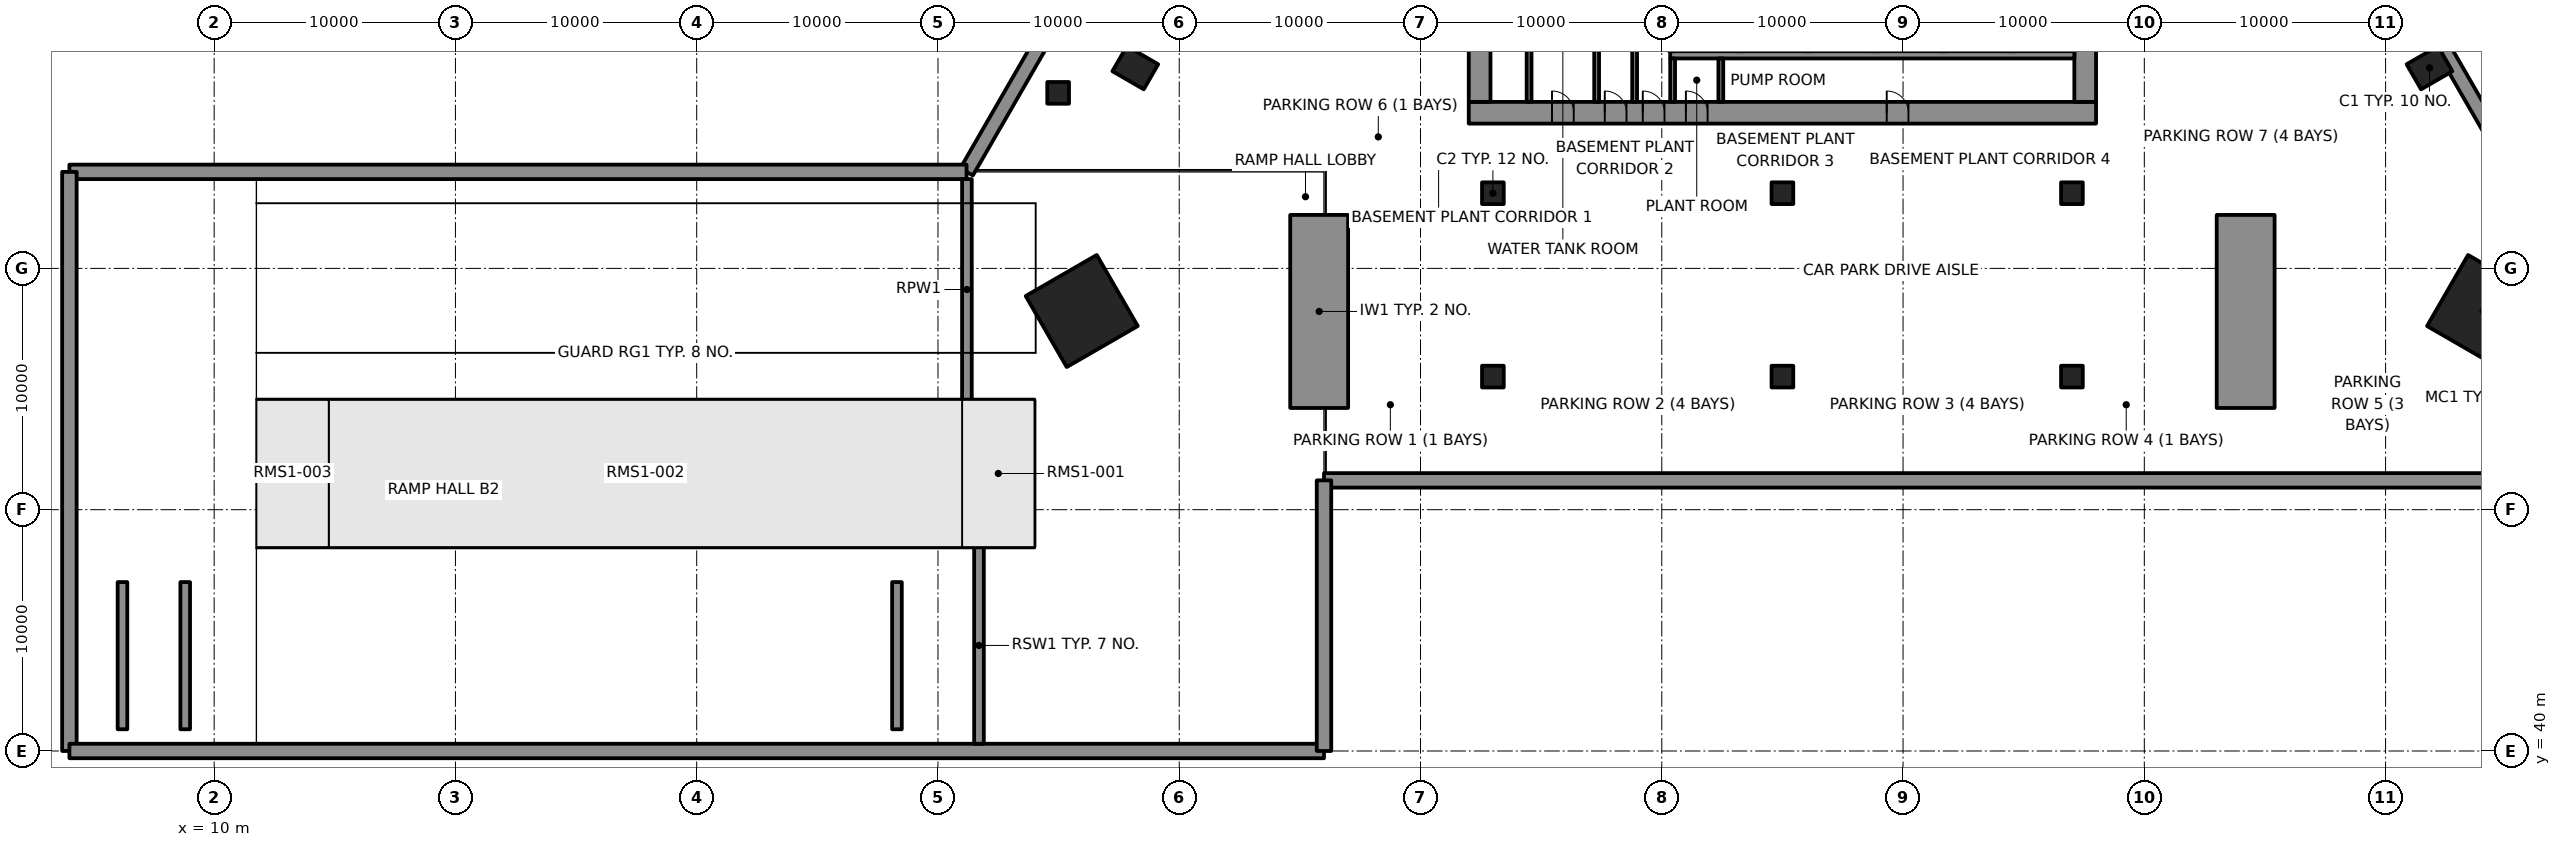
"""IFC4 building model, lengths in metres.
Left out: names, types, materials, properties, quantities, classifications, styles, units other than length and angle.
Written with IfcOpenShell. Run it as: python <this file> out.ifc"""

import sys

from ifc_helpers import new_model, si_unit, direction, frame, frame_2d, origin, origin_2d, place, context, subcontext, project, spatial, rectangle, extrude, element, fill, save


model = new_model("IFC4")
c1 = context("Model", 3, precision=1e-05, world=origin(), true_north=direction((0.0, 1.0)))
c2 = subcontext(c1, "Body", "Model", "MODEL_VIEW")
j1 = project(units=[si_unit("LENGTHUNIT", "METRE"), si_unit("PLANEANGLEUNIT", "RADIAN")], contexts=[c1])
p1 = place(None, origin())
s1 = spatial("IfcSite", under=j1, at=p1, CompositionType="ELEMENT")
p2 = place(p1, origin())
s2 = spatial("IfcBuilding", under=s1, at=p2, CompositionType="ELEMENT")
p3 = place(p2, frame((0.0, 0.0, -9.5)))
s3 = spatial("IfcBuildingStorey", under=s2, at=p3, CompositionType="ELEMENT", Elevation=-9.5)
p4 = place(p3, frame((56.0, 51.215, -0.35), z_axis=(0.0, 0.0, 1.0), x_axis=(1.0, 0.0, 0.0)))
e1 = element("IfcWall", 1, at=p4, inside=s3, PredefinedType="SOLIDWALL", context=c2, shape_type="SweptSolid", body=[
    extrude(rectangle(XDim=49.532, YDim=0.6, at=frame_2d((24.766, 0.0))), origin(), (0.0, 0.0, 1.0), 4.5),
])
p5 = place(p3, frame((109.132, 57.451, -0.35), z_axis=(0.0, 0.0, 1.0), x_axis=(-0.499999206999, 0.866025861623, 0.0)))
e2 = element("IfcWall", 2, at=p5, inside=s3, PredefinedType="SOLIDWALL", context=c2, shape_type="SweptSolid", body=[
    extrude(rectangle(XDim=61.064, YDim=0.6, at=frame_2d((30.532, 0.0))), origin(), (0.0, 0.0, 1.0), 4.5),
])
p6 = place(p3, frame((67.936, 110.334, -0.35), z_axis=(0.0, 0.0, 1.0), x_axis=(-0.499999089162, -0.866025929656, 0.0)))
e3 = element("IfcWall", 3, at=p6, inside=s3, PredefinedType="SOLIDWALL", context=c2, shape_type="SweptSolid", body=[
    extrude(rectangle(XDim=53.501, YDim=0.6, at=frame_2d((26.751, 0.0))), origin(), (0.0, 0.0, 1.0), 4.5),
])
p7 = place(p3, frame((41.185, 64.0, -0.35), z_axis=(0.0, 0.0, 1.0), x_axis=(-1.0, 0.0, 0.0)))
e4 = element("IfcWall", 4, at=p7, inside=s3, PredefinedType="SOLIDWALL", context=c2, shape_type="SweptSolid", body=[
    extrude(rectangle(XDim=37.185, YDim=0.6, at=frame_2d((18.593, 0.0))), origin(), (0.0, 0.0, 1.0), 4.5),
])
p8 = place(p3, frame((4.0, 64.0, -0.35), z_axis=(0.0, 0.0, 1.0), x_axis=(0.0, -1.0, 0.0)))
e5 = element("IfcWall", 5, at=p8, inside=s3, PredefinedType="SOLIDWALL", context=c2, shape_type="SweptSolid", body=[
    extrude(rectangle(XDim=24.0, YDim=0.6, at=frame_2d((12.0, 0.0))), origin(), (0.0, 0.0, 1.0), 4.5),
])
p9 = place(p3, frame((4.0, 40.0, -0.35), z_axis=(0.0, 0.0, 1.0), x_axis=(1.0, 0.0, 0.0)))
e6 = element("IfcWall", 6, at=p9, inside=s3, PredefinedType="SOLIDWALL", context=c2, shape_type="SweptSolid", body=[
    extrude(rectangle(XDim=52.0, YDim=0.6, at=frame_2d((26.0, 0.0))), origin(), (0.0, 0.0, 1.0), 4.5),
])
p10 = place(p3, frame((56.0, 40.0, -0.35), z_axis=(0.0, 0.0, 1.0), x_axis=(0.0, 1.0, 0.0)))
e7 = element("IfcWall", 7, at=p10, inside=s3, PredefinedType="SOLIDWALL", context=c2, shape_type="SweptSolid", body=[
    extrude(rectangle(XDim=11.215, YDim=0.6, at=frame_2d((5.608, 0.0))), origin(), (0.0, 0.0, 1.0), 4.5),
])
for number, where, z_axis, x_axis in (
    (8, (55.8, 54.215, -0.35), (0.0, 0.0, 1.0), (0.0, 1.0, 0.0)),
    (9, (94.2, 54.215, -0.35), (0.0, 0.0, 1.0), (0.0, 1.0, 0.0)),
):
    element("IfcWall", number, at=place(p3, frame(where, z_axis=z_axis, x_axis=x_axis)), inside=s3, PredefinedType="SHEAR", context=c2, shape_type="SweptSolid", body=[
        extrude(rectangle(XDim=8.0, YDim=2.4, at=frame_2d((4.0, 0.0))), origin(), (0.0, 0.0, 1.0), 4.5),
    ])
for number, where, z_axis, x_axis in (
    (10, (101.821, 68.315, 0.0), (0.0, 0.0, 1.0), (-0.5, 0.866, 0.0)),
    (11, (48.179, 68.315, 0.0), (0.0, 0.0, 1.0), (-0.5, -0.866, 0.0)),
):
    element("IfcColumn", number, at=place(p3, frame(where, z_axis=z_axis, x_axis=x_axis)), inside=s3, PredefinedType="COLUMN", context=c2, shape_type="SweptSolid", body=[
        extrude(rectangle(XDim=1.2, YDim=1.5, at=origin_2d()), origin(), (0.0, 0.0, 1.0), 4.5),
    ])
for number, where, z_axis, x_axis in (
    (12, (63.0, 63.115, 0.0), (0.0, 0.0, 1.0), (1.0, 0.0, 0.0)),
    (13, (75.0, 63.115, 0.0), (0.0, 0.0, 1.0), (1.0, 0.0, 0.0)),
    (14, (87.0, 63.115, 0.0), (0.0, 0.0, 1.0), (1.0, 0.0, 0.0)),
    (15, (63.0, 55.515, 0.0), (0.0, 0.0, 1.0), (1.0, 0.0, 0.0)),
    (16, (75.0, 55.515, 0.0), (0.0, 0.0, 1.0), (1.0, 0.0, 0.0)),
    (17, (87.0, 55.515, 0.0), (0.0, 0.0, 1.0), (1.0, 0.0, 0.0)),
    (18, (44.98, 67.274, 0.0), (0.0, 0.0, 1.0), (1.0, 0.0, 0.0)),
):
    element("IfcColumn", number, at=place(p3, frame(where, z_axis=z_axis, x_axis=x_axis)), inside=s3, PredefinedType="COLUMN", context=c2, shape_type="SweptSolid", body=[
        extrude(rectangle(XDim=0.9, YDim=0.9, at=origin_2d()), origin(), (0.0, 0.0, 1.0), 4.5),
    ])
for number, where, z_axis, x_axis in (
    (19, (104.041, 58.233, 0.0), (0.0, 0.0, 1.0), (0.5, 0.866, 0.0)),
    (20, (45.959, 58.233, 0.0), (0.0, 0.0, 1.0), (0.5, -0.866, 0.0)),
):
    element("IfcColumn", number, at=place(p3, frame(where, z_axis=z_axis, x_axis=x_axis)), inside=s3, PredefinedType="COLUMN", context=c2, shape_type="SweptSolid", body=[
        extrude(rectangle(XDim=3.4, YDim=3.4, at=origin_2d()), origin(), (0.0, 0.0, 1.0), 4.5),
    ])
p11 = place(p3, frame((62.0, 66.45, 0.0), z_axis=(0.0, 0.0, 1.0), x_axis=(1.0, 0.0, 0.0)))
e21 = element("IfcWall", 21, at=p11, inside=s3, PredefinedType="SHEAR", context=c2, shape_type="SweptSolid", body=[
    extrude(rectangle(XDim=26.0, YDim=0.9, at=frame_2d((13.0, 0.0))), origin(), (0.0, 0.0, 1.0), 4.15),
])
p12 = place(p11, frame((3.45, 0.0, 0.0)))
e22 = element("IfcOpeningElement", 22, at=p12, cuts=e21, PredefinedType="OPENING", context=c2, shape_type="SweptSolid", body=[
    extrude(rectangle(XDim=0.9, YDim=2.1, at=frame_2d((0.45, 1.05))), frame((0.0, 0.46, 0.0), z_axis=(0.0, -1.0, 0.0), x_axis=(1.0, 0.0, 0.0)), (0.0, 0.0, 1.0), 0.92),
])
p13 = place(p11, frame((5.637, 0.0, 0.0)))
e23 = element("IfcOpeningElement", 23, at=p13, cuts=e21, PredefinedType="OPENING", context=c2, shape_type="SweptSolid", body=[
    extrude(rectangle(XDim=0.9, YDim=2.1, at=frame_2d((0.45, 1.05))), frame((0.0, 0.46, 0.0), z_axis=(0.0, -1.0, 0.0), x_axis=(1.0, 0.0, 0.0)), (0.0, 0.0, 1.0), 0.92),
])
p14 = place(p11, frame((7.212, 0.0, 0.0)))
e24 = element("IfcOpeningElement", 24, at=p14, cuts=e21, PredefinedType="OPENING", context=c2, shape_type="SweptSolid", body=[
    extrude(rectangle(XDim=0.9, YDim=2.1, at=frame_2d((0.45, 1.05))), frame((0.0, 0.46, 0.0), z_axis=(0.0, -1.0, 0.0), x_axis=(1.0, 0.0, 0.0)), (0.0, 0.0, 1.0), 0.92),
])
p15 = place(p11, frame((8.999, 0.0, 0.0)))
e25 = element("IfcOpeningElement", 25, at=p15, cuts=e21, PredefinedType="OPENING", context=c2, shape_type="SweptSolid", body=[
    extrude(rectangle(XDim=0.9, YDim=2.1, at=frame_2d((0.45, 1.05))), frame((0.0, 0.46, 0.0), z_axis=(0.0, -1.0, 0.0), x_axis=(1.0, 0.0, 0.0)), (0.0, 0.0, 1.0), 0.92),
])
p16 = place(p11, frame((17.324, 0.0, 0.0)))
e26 = element("IfcOpeningElement", 26, at=p16, cuts=e21, PredefinedType="OPENING", context=c2, shape_type="SweptSolid", body=[
    extrude(rectangle(XDim=0.9, YDim=2.1, at=frame_2d((0.45, 1.05))), frame((0.0, 0.46, 0.0), z_axis=(0.0, -1.0, 0.0), x_axis=(1.0, 0.0, 0.0)), (0.0, 0.0, 1.0), 0.92),
])
p17 = place(p3, frame((62.45, 66.9, 0.0), z_axis=(0.0, 0.0, 1.0), x_axis=(0.0, 1.0, 0.0)))
e27 = element("IfcWall", 27, at=p17, inside=s3, PredefinedType="SHEAR", context=c2, shape_type="SweptSolid", body=[
    extrude(rectangle(XDim=16.2, YDim=0.9, at=frame_2d((8.1, 0.0))), origin(), (0.0, 0.0, 1.0), 4.15),
])
p18 = place(p17, frame((5.5, 0.0, 0.0)))
e28 = element("IfcOpeningElement", 28, at=p18, cuts=e27, PredefinedType="OPENING", context=c2, shape_type="SweptSolid", body=[
    extrude(rectangle(XDim=1.8, YDim=2.1, at=frame_2d((0.9, 1.05))), frame((0.0, 0.46, 0.0), z_axis=(0.0, -1.0, 0.0), x_axis=(1.0, 0.0, 0.0)), (0.0, 0.0, 1.0), 0.92),
])
p19 = place(p3, frame((87.55, 66.9, 0.0), z_axis=(0.0, 0.0, 1.0), x_axis=(0.0, 1.0, 0.0)))
e29 = element("IfcWall", 29, at=p19, inside=s3, PredefinedType="SHEAR", context=c2, shape_type="SweptSolid", body=[
    extrude(rectangle(XDim=16.2, YDim=0.9, at=frame_2d((8.1, 0.0))), origin(), (0.0, 0.0, 1.0), 4.15),
])
p20 = place(p19, frame((5.5, 0.0, 0.0)))
e30 = element("IfcOpeningElement", 30, at=p20, cuts=e29, PredefinedType="OPENING", context=c2, shape_type="SweptSolid", body=[
    extrude(rectangle(XDim=1.8, YDim=2.1, at=frame_2d((0.9, 1.05))), frame((0.0, 0.46, 0.0), z_axis=(0.0, -1.0, 0.0), x_axis=(1.0, 0.0, 0.0)), (0.0, 0.0, 1.0), 0.92),
])
p21 = place(p19, frame((11.202, 0.0, 0.0)))
e31 = element("IfcOpeningElement", 31, at=p21, cuts=e29, PredefinedType="OPENING", context=c2, shape_type="SweptSolid", body=[
    extrude(rectangle(XDim=0.9, YDim=2.1, at=frame_2d((0.45, 1.05))), frame((0.0, 0.46, 0.0), z_axis=(0.0, -1.0, 0.0), x_axis=(1.0, 0.0, 0.0)), (0.0, 0.0, 1.0), 0.92),
])
p22 = place(p3, frame((70.35, 68.85, 0.0), z_axis=(0.0, 0.0, 1.0), x_axis=(1.0, 0.0, 0.0)))
e32 = element("IfcWall", 32, at=p22, inside=s3, PredefinedType="SHEAR", context=c2, shape_type="SweptSolid", body=[
    extrude(rectangle(XDim=16.75, YDim=0.3, at=frame_2d((8.375, 0.0))), origin(), (0.0, 0.0, 1.0), 4.15),
])
for number, where, z_axis, x_axis in (
    (33, (64.5, 66.9, 0.0), (0.0, 0.0, 1.0), (0.0, 1.0, 0.0)),
    (34, (67.3, 66.9, 0.0), (0.0, 0.0, 1.0), (0.0, 1.0, 0.0)),
    (35, (68.875, 66.9, 0.0), (0.0, 0.0, 1.0), (0.0, 1.0, 0.0)),
):
    element("IfcWall", number, at=place(p3, frame(where, z_axis=z_axis, x_axis=x_axis)), inside=s3, PredefinedType="PARTITIONING", context=c2, shape_type="SweptSolid", body=[
        extrude(rectangle(XDim=4.75, YDim=0.2, at=frame_2d((2.375, 0.0))), origin(), (0.0, 0.0, 1.0), 4.15),
    ])
for number, where, z_axis, x_axis in (
    (36, (70.45, 66.9, 0.0), (0.0, 0.0, 1.0), (0.0, 1.0, 0.0)),
    (37, (72.448, 66.9, 0.0), (0.0, 0.0, 1.0), (0.0, 1.0, 0.0)),
):
    element("IfcWall", number, at=place(p3, frame(where, z_axis=z_axis, x_axis=x_axis)), inside=s3, PredefinedType="PARTITIONING", context=c2, shape_type="SweptSolid", body=[
        extrude(rectangle(XDim=1.8, YDim=0.2, at=frame_2d((0.9, 0.0))), origin(), (0.0, 0.0, 1.0), 4.15),
    ])
for number, where, z_axis, x_axis in (
    (38, (8.8, 40.9, -0.35), (0.0, 0.0, 1.0), (0.0, 1.0, 0.0)),
    (39, (38.3, 40.9, -0.35), (0.0, 0.0, 1.0), (0.0, 1.0, 0.0)),
):
    element("IfcWall", number, at=place(p3, frame(where, z_axis=z_axis, x_axis=x_axis)), inside=s3, PredefinedType="SOLIDWALL", context=c2, shape_type="SweptSolid", body=[
        extrude(rectangle(XDim=6.1, YDim=0.4, at=frame_2d((3.05, 0.0))), origin(), (0.0, 0.0, 1.0), 4.5),
    ])
p23 = place(p3, frame((6.0, 43.95, -0.35), z_axis=(0.0, 0.0, 1.0), x_axis=(1.0, 0.0, 0.0)))
e40 = element("IfcWall", 40, at=p23, inside=s3, PredefinedType="SOLIDWALL", context=c2, shape_type="SweptSolid", body=[
    extrude(rectangle(XDim=0.4, YDim=6.1, at=frame_2d((0.2, 0.0))), origin(), (0.0, 0.0, 1.0), 4.5),
])
p24 = place(p3, frame((41.2, 48.45, -0.35), z_axis=(0.0, 0.0, 1.0), x_axis=(0.0, 1.0, 0.0)))
e41 = element("IfcWall", 41, at=p24, inside=s3, PredefinedType="SOLIDWALL", context=c2, shape_type="SweptSolid", body=[
    extrude(rectangle(XDim=6.1, YDim=0.4, at=frame_2d((3.05, 0.0))), origin(), (0.0, 0.0, 1.0), 4.317),
])
p25 = place(p3, frame((14.95, 48.45, -0.35), z_axis=(0.0, 0.0, 1.0), x_axis=(0.0, 1.0, 0.0)))
e42 = element("IfcWall", 42, at=p25, inside=s3, PredefinedType="SOLIDWALL", context=c2, shape_type="SweptSolid", body=[
    extrude(rectangle(XDim=6.1, YDim=0.4, at=frame_2d((3.05, 0.0))), origin(), (0.0, 0.0, 1.0), 0.483),
])
p26 = place(p3, frame((43.6, 51.5, -0.35), z_axis=(0.0, 0.0, 1.0), x_axis=(1.0, 0.0, 0.0)))
e43 = element("IfcWall", 43, at=p26, inside=s3, PredefinedType="SOLIDWALL", context=c2, shape_type="SweptSolid", body=[
    extrude(rectangle(XDim=0.4, YDim=6.1, at=frame_2d((0.2, 0.0))), origin(), (0.0, 0.0, 1.0), 4.5),
])
p27 = place(p3, frame((41.7, 40.3, -0.35), z_axis=(0.0, 0.0, 1.0), x_axis=(0.0, 1.0, 0.0)))
e44 = element("IfcWall", 44, at=p27, inside=s3, PredefinedType="SOLIDWALL", context=c2, shape_type="SweptSolid", body=[
    extrude(rectangle(XDim=8.15, YDim=0.4, at=frame_2d((4.075, 0.0))), origin(), (0.0, 0.0, 1.0), 4.5),
])
p28 = place(p3, frame((41.2, 54.55, -0.35), z_axis=(0.0, 0.0, 1.0), x_axis=(0.0, 1.0, 0.0)))
e45 = element("IfcWall", 45, at=p28, inside=s3, PredefinedType="SOLIDWALL", context=c2, shape_type="SweptSolid", body=[
    extrude(rectangle(XDim=9.15, YDim=0.4, at=frame_2d((4.575, 0.0))), origin(), (0.0, 0.0, 1.0), 4.419),
])
p29 = place(p12, origin())
e46 = element("IfcDoor", 46, at=p29, inside=s3, OperationType="SINGLE_SWING_LEFT", PredefinedType="DOOR", context=c2, shape_type="SweptSolid", body=[
    extrude(rectangle(XDim=0.9, YDim=2.1, at=frame_2d((0.45, 1.05))), frame((0.0, 0.17, 0.0), z_axis=(0.0, -1.0, 0.0), x_axis=(1.0, 0.0, 0.0)), (0.0, 0.0, 1.0), 0.34),
])
fill(e22, e46)
p30 = place(p13, origin())
e47 = element("IfcDoor", 47, at=p30, inside=s3, OperationType="SINGLE_SWING_RIGHT", PredefinedType="DOOR", context=c2, shape_type="SweptSolid", body=[
    extrude(rectangle(XDim=0.9, YDim=2.1, at=frame_2d((0.45, 1.05))), frame((0.0, 0.17, 0.0), z_axis=(0.0, -1.0, 0.0), x_axis=(1.0, 0.0, 0.0)), (0.0, 0.0, 1.0), 0.34),
])
fill(e23, e47)
p31 = place(p14, origin())
e48 = element("IfcDoor", 48, at=p31, inside=s3, OperationType="SINGLE_SWING_LEFT", PredefinedType="DOOR", context=c2, shape_type="SweptSolid", body=[
    extrude(rectangle(XDim=0.9, YDim=2.1, at=frame_2d((0.45, 1.05))), frame((0.0, 0.17, 0.0), z_axis=(0.0, -1.0, 0.0), x_axis=(1.0, 0.0, 0.0)), (0.0, 0.0, 1.0), 0.34),
])
fill(e24, e48)
p32 = place(p15, origin())
e49 = element("IfcDoor", 49, at=p32, inside=s3, OperationType="SINGLE_SWING_RIGHT", PredefinedType="DOOR", context=c2, shape_type="SweptSolid", body=[
    extrude(rectangle(XDim=0.9, YDim=2.1, at=frame_2d((0.45, 1.05))), frame((0.0, 0.17, 0.0), z_axis=(0.0, -1.0, 0.0), x_axis=(1.0, 0.0, 0.0)), (0.0, 0.0, 1.0), 0.34),
])
fill(e25, e49)
p33 = place(p16, origin())
e50 = element("IfcDoor", 50, at=p33, inside=s3, OperationType="SINGLE_SWING_LEFT", PredefinedType="DOOR", context=c2, shape_type="SweptSolid", body=[
    extrude(rectangle(XDim=0.9, YDim=2.1, at=frame_2d((0.45, 1.05))), frame((0.0, 0.17, 0.0), z_axis=(0.0, -1.0, 0.0), x_axis=(1.0, 0.0, 0.0)), (0.0, 0.0, 1.0), 0.34),
])
fill(e26, e50)
save(model, sys.argv[1])
